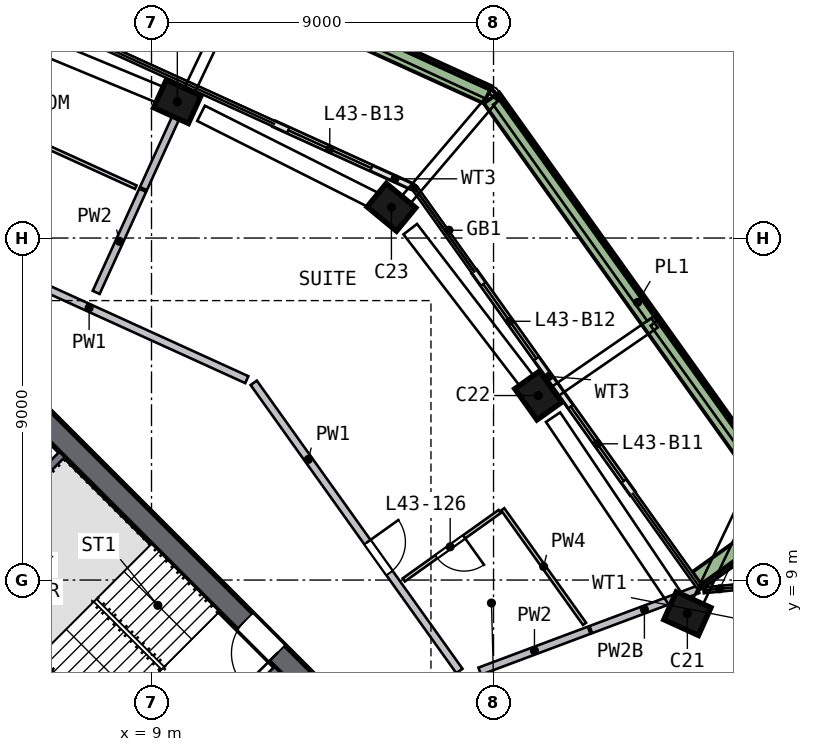
"""IFC4 building model, lengths in metres.
Left out: names, types, materials, properties, quantities, classifications, styles, units other than length and angle.
Written with IfcOpenShell. Run it as: python <this file> out.ifc"""

import sys

from ifc_helpers import new_model, si_unit, direction, frame, frame_2d, origin, origin_2d, place, context, subcontext, project, spatial, rectangle, extrude, element, fill, save


model = new_model("IFC4")
c1 = context("Model", 3, precision=1e-05, world=origin(), true_north=direction((0.0, 1.0)))
c2 = subcontext(c1, "Body", "Model", "MODEL_VIEW")
j1 = project(units=[si_unit("LENGTHUNIT", "METRE"), si_unit("PLANEANGLEUNIT", "RADIAN")], contexts=[c1])
p1 = place(None, origin())
s1 = spatial("IfcSite", under=j1, at=p1, CompositionType="ELEMENT")
p2 = place(p1, origin())
s2 = spatial("IfcBuilding", under=s1, at=p2, CompositionType="ELEMENT")
p3 = place(p2, frame((0.0, 0.0, 180.0)))
s3 = spatial("IfcBuildingStorey", under=s2, at=p3, CompositionType="ELEMENT", Elevation=180.0)
p4 = place(p3, frame((23.147, 7.984, 0.0), z_axis=(-0.038919032, 0.109763833, 0.993195454), x_axis=(0.910035623, -0.4066191, 0.080598211)))
e1 = element("IfcColumn", 1, at=p4, inside=s3, PredefinedType="COLUMN", context=c2, shape_type="SweptSolid", body=[
    extrude(rectangle(XDim=1.0, YDim=0.8, at=origin_2d()), origin(), (0.0, 0.0, 1.0), 3.212),
])
p5 = place(p3, frame((19.256, 13.745, 0.0), z_axis=(-0.066161617, 0.091105306, 0.993641013), x_axis=(-0.577029592, 0.808925346, -0.112590564)))
e2 = element("IfcColumn", 2, at=p5, inside=s3, PredefinedType="COLUMN", context=c2, shape_type="SweptSolid", body=[
    extrude(rectangle(XDim=1.0, YDim=0.8, at=origin_2d()), origin(), (0.0, 0.0, 1.0), 3.21),
])
p6 = place(p3, frame((15.421, 18.721, 0.0), z_axis=(-0.089631902, 0.072602601, 0.993325216), x_axis=(0.766538339, -0.631755416, 0.115343267)))
e3 = element("IfcColumn", 3, at=p6, inside=s3, PredefinedType="COLUMN", context=c2, shape_type="SweptSolid", body=[
    extrude(rectangle(XDim=1.0, YDim=0.8, at=origin_2d()), origin(), (0.0, 0.0, 1.0), 3.211),
])
p7 = place(p3, frame((9.803, 21.531, 0.0), z_axis=(-0.102817207, 0.045781034, 0.993646174), x_axis=(-0.904266328, 0.411868945, -0.112545016)))
e4 = element("IfcColumn", 4, at=p7, inside=s3, PredefinedType="COLUMN", context=c2, shape_type="SweptSolid", body=[
    extrude(rectangle(XDim=1.0, YDim=0.8, at=origin_2d()), origin(), (0.0, 0.0, 1.0), 3.21),
])
p8 = place(p3, frame((13.788, 5.587, 0.0), z_axis=(0.0, 0.0, 1.0), x_axis=(-0.707106781, 0.707106781, 0.0)))
e5 = element("IfcWall", 5, at=p8, inside=s3, PredefinedType="SHEAR", context=c2, shape_type="SweptSolid", body=[
    extrude(rectangle(XDim=11.598, YDim=0.6, at=frame_2d((5.799, 0.0))), origin(), (0.0, 0.0, 1.0), 3.5),
])
p9 = place(p8, frame((2.099, 0.0, 0.0)))
e6 = element("IfcOpeningElement", 6, at=p9, cuts=e5, PredefinedType="OPENING", context=c2, shape_type="SweptSolid", body=[
    extrude(rectangle(XDim=1.2, YDim=2.1, at=frame_2d((0.6, 1.05))), frame((0.0, 0.31, 0.0), z_axis=(0.0, -1.0, 0.0), x_axis=(1.0, 0.0, 0.0)), (0.0, 0.0, 1.0), 0.62),
])
p10 = place(p3, frame((21.658, 11.283, 0.0), z_axis=(0.0, 0.0, 1.0), x_axis=(-0.580980052, 0.813917796, 0.0)))
e7 = element("IfcWall", 7, at=p10, inside=s3, PredefinedType="SOLIDWALL", context=c2, shape_type="SweptSolid", body=[
    extrude(rectangle(XDim=3.4, YDim=0.15, at=frame_2d((1.7, 0.0))), origin(), (0.0, 0.0, 1.0), 2.475),
])
p11 = place(p10, frame((0.4, 0.0, 0.0)))
e8 = element("IfcOpeningElement", 8, at=p11, cuts=e7, PredefinedType="OPENING", context=c2, shape_type="SweptSolid", body=[
    extrude(rectangle(XDim=2.4, YDim=2.4, at=frame_2d((1.2, 1.2))), frame((0.0, 0.085, 0.0), z_axis=(0.0, -1.0, 0.0), x_axis=(1.0, 0.0, 0.0)), (0.0, 0.0, 1.0), 0.17),
])
p12 = place(p3, frame((19.683, 14.05, 0.0), z_axis=(0.0, 0.0, 1.0), x_axis=(-0.581004847, 0.813900097, 0.0)))
e9 = element("IfcWall", 9, at=p12, inside=s3, PredefinedType="SOLIDWALL", context=c2, shape_type="SweptSolid", body=[
    extrude(rectangle(XDim=3.761, YDim=0.15, at=frame_2d((1.881, 0.0))), origin(), (0.0, 0.0, 1.0), 2.475),
])
p13 = place(p12, frame((0.961, 0.0, 0.0)))
e10 = element("IfcOpeningElement", 10, at=p13, cuts=e9, PredefinedType="OPENING", context=c2, shape_type="SweptSolid", body=[
    extrude(rectangle(XDim=2.4, YDim=2.4, at=frame_2d((1.2, 1.2))), frame((0.0, 0.085, 0.0), z_axis=(0.0, -1.0, 0.0), x_axis=(1.0, 0.0, 0.0)), (0.0, 0.0, 1.0), 0.17),
])
p14 = place(p3, frame((15.845, 19.357, 0.0), z_axis=(0.0, 0.0, 1.0), x_axis=(-0.910094415, 0.41440096, 0.0)))
e11 = element("IfcWall", 11, at=p14, inside=s3, PredefinedType="SOLIDWALL", context=c2, shape_type="SweptSolid", body=[
    extrude(rectangle(XDim=3.967, YDim=0.15, at=frame_2d((1.984, 0.0))), origin(), (0.0, 0.0, 1.0), 2.475),
])
p15 = place(p14, frame((1.167, 0.0, 0.0)))
e12 = element("IfcOpeningElement", 12, at=p15, cuts=e11, PredefinedType="OPENING", context=c2, shape_type="SweptSolid", body=[
    extrude(rectangle(XDim=2.4, YDim=2.4, at=frame_2d((1.2, 1.2))), frame((0.0, 0.085, 0.0), z_axis=(0.0, -1.0, 0.0), x_axis=(1.0, 0.0, 0.0)), (0.0, 0.0, 1.0), 0.17),
])
p16 = place(p3, frame((23.376, 9.007, 0.0), z_axis=(0.0, 0.0, 1.0), x_axis=(0.813882991, 0.581028808, 0.0)))
e13 = element("IfcWall", 13, at=p16, inside=s3, PredefinedType="SOLIDWALL", context=c2, shape_type="SweptSolid", body=[
    extrude(rectangle(XDim=3.199, YDim=0.5, at=frame_2d((1.6, 0.0))), origin(), (0.0, 0.0, 1.0), 0.7),
])
p17 = place(p3, frame((25.631, 10.924, 0.0), z_axis=(0.0, 0.0, 1.0), x_axis=(-0.580986673, 0.81391307, 0.0)))
e14 = element("IfcWall", 14, at=p17, inside=s3, PredefinedType="SOLIDWALL", context=c2, shape_type="SweptSolid", body=[
    extrude(rectangle(XDim=13.223, YDim=0.5, at=frame_2d((6.612, 0.0))), origin(), (0.0, 0.0, 1.0), 0.7),
])
p18 = place(p3, frame((17.849, 21.769, 0.0), z_axis=(0.0, 0.0, 1.0), x_axis=(-0.910109197, 0.414368494, 0.0)))
e15 = element("IfcWall", 15, at=p18, inside=s3, PredefinedType="SOLIDWALL", context=c2, shape_type="SweptSolid", body=[
    extrude(rectangle(XDim=13.723, YDim=0.5, at=frame_2d((6.862, 0.0))), origin(), (0.0, 0.0, 1.0), 0.7),
])
p19 = place(p3, frame((3.24, 9.629, 0.0), z_axis=(0.0, 0.0, 1.0), x_axis=(0.707106781, -0.707106781, 0.0)))
e16 = element("IfcWall", 16, at=p19, inside=s3, PredefinedType="SOLIDWALL", context=c2, shape_type="SweptSolid", body=[
    extrude(rectangle(XDim=9.036, YDim=0.2, at=frame_2d((4.518, 0.0))), origin(), (0.0, 0.0, 1.0), 3.19),
])
p20 = place(p19, frame((7.018, 0.0, 0.0)))
e17 = element("IfcOpeningElement", 17, at=p20, cuts=e16, PredefinedType="OPENING", context=c2, shape_type="SweptSolid", body=[
    extrude(rectangle(XDim=1.2, YDim=2.1, at=frame_2d((0.6, 1.05))), frame((0.0, 0.11, 0.0), z_axis=(0.0, -1.0, 0.0), x_axis=(1.0, 0.0, 0.0)), (0.0, 0.0, 1.0), 0.22),
])
for number, where, z_axis, x_axis in (
    (18, (9.334, 3.677, 0.0), (0.0, 0.0, 1.0), (0.707, 0.707, 0.0)),
    (19, (3.677, 9.334, 0.0), (0.0, 0.0, 1.0), (0.707, 0.707, 0.0)),
):
    element("IfcWall", number, at=place(p3, frame(where, z_axis=z_axis, x_axis=x_axis)), inside=s3, PredefinedType="SOLIDWALL", context=c2, shape_type="SweptSolid", body=[
        extrude(rectangle(XDim=4.2, YDim=0.2, at=frame_2d((2.1, 0.0))), origin(), (0.0, 0.0, 1.0), 3.19),
    ])
p21 = place(p3, frame((11.507, 14.273, 0.0), z_axis=(0.0, 0.0, 1.0), x_axis=(-0.910097551, 0.414394073, 0.0)))
e20 = element("IfcWall", 20, at=p21, inside=s3, PredefinedType="SOLIDWALL", context=c2, shape_type="SweptSolid", body=[
    extrude(rectangle(XDim=9.116, YDim=0.2, at=frame_2d((4.558, 0.0))), origin(), (0.0, 0.0, 1.0), 3.19),
])
p22 = place(p3, frame((11.689, 14.19, 0.0), z_axis=(0.0, 0.0, 1.0), x_axis=(0.581002663, -0.813901656, 0.0)))
e21 = element("IfcWall", 21, at=p22, inside=s3, PredefinedType="SOLIDWALL", context=c2, shape_type="SweptSolid", body=[
    extrude(rectangle(XDim=9.316, YDim=0.2, at=frame_2d((4.658, 0.0))), origin(), (0.0, 0.0, 1.0), 3.19),
])
p23 = place(p22, frame((5.15, 0.0, 0.0)))
e22 = element("IfcOpeningElement", 22, at=p23, cuts=e21, PredefinedType="OPENING", context=c2, shape_type="SweptSolid", body=[
    extrude(rectangle(XDim=1.0, YDim=2.1, at=frame_2d((0.5, 1.05))), frame((0.0, 0.11, 0.0), z_axis=(0.0, -1.0, 0.0), x_axis=(1.0, 0.0, 0.0)), (0.0, 0.0, 1.0), 0.22),
])
p24 = place(p3, frame((7.544, 16.569, 0.0), z_axis=(0.0, 0.0, 1.0), x_axis=(0.414394291, 0.910097452, 0.0)))
e23 = element("IfcWall", 23, at=p24, inside=s3, PredefinedType="SOLIDWALL", context=c2, shape_type="SweptSolid", body=[
    extrude(rectangle(XDim=2.955, YDim=0.2, at=frame_2d((1.477, 0.0))), origin(), (0.0, 0.0, 1.0), 3.19),
])
p25 = place(p3, frame((8.787, 19.3, 0.0), z_axis=(0.0, 0.0, 1.0), x_axis=(0.414411335, 0.910089691, 0.0)))
e24 = element("IfcWall", 24, at=p25, inside=s3, PredefinedType="SOLIDWALL", context=c2, shape_type="SweptSolid", body=[
    extrude(rectangle(XDim=2.902, YDim=0.2, at=frame_2d((1.451, 0.0))), origin(), (0.0, 0.0, 1.0), 3.19),
])
p26 = place(p3, frame((17.637, 6.601, 0.0), z_axis=(0.0, 0.0, 1.0), x_axis=(0.936531348, 0.350583848, 0.0)))
e25 = element("IfcWall", 25, at=p26, inside=s3, PredefinedType="SOLIDWALL", context=c2, shape_type="SweptSolid", body=[
    extrude(rectangle(XDim=3.074, YDim=0.2, at=frame_2d((1.537, 0.0))), origin(), (0.0, 0.0, 1.0), 3.19),
])
p27 = place(p3, frame((20.56, 7.695, 0.0), z_axis=(0.0, 0.0, 1.0), x_axis=(0.93656885, 0.350483651, 0.0)))
e26 = element("IfcWall", 26, at=p27, inside=s3, PredefinedType="SOLIDWALL", context=c2, shape_type="SweptSolid", body=[
    extrude(rectangle(XDim=3.011, YDim=0.2, at=frame_2d((1.506, 0.0))), origin(), (0.0, 0.0, 1.0), 2.69),
])
p28 = place(p3, frame((8.585, 19.339, 0.0), z_axis=(0.0, 0.0, 1.0), x_axis=(-0.910093777, 0.414402362, 0.0)))
e27 = element("IfcWall", 27, at=p28, inside=s3, PredefinedType="PARTITIONING", context=c2, shape_type="SweptSolid", body=[
    extrude(rectangle(XDim=2.7, YDim=0.1, at=frame_2d((1.35, 0.0))), origin(), (0.0, 0.0, 1.0), 3.19),
])
p29 = place(p3, frame((18.161, 10.803, 0.0), z_axis=(0.0, 0.0, 1.0), x_axis=(-0.813898407, -0.581007214, 0.0)))
e28 = element("IfcWall", 28, at=p29, inside=s3, PredefinedType="PARTITIONING", context=c2, shape_type="SweptSolid", body=[
    extrude(rectangle(XDim=3.1, YDim=0.1, at=frame_2d((1.55, 0.0))), origin(), (0.0, 0.0, 1.0), 3.19),
])
p30 = place(p29, frame((1.15, 0.0, 0.0)))
e29 = element("IfcOpeningElement", 29, at=p30, cuts=e28, PredefinedType="OPENING", context=c2, shape_type="SweptSolid", body=[
    extrude(rectangle(XDim=0.9, YDim=2.1, at=frame_2d((0.45, 1.05))), frame((0.0, 0.06, 0.0), z_axis=(0.0, -1.0, 0.0), x_axis=(1.0, 0.0, 0.0)), (0.0, 0.0, 1.0), 0.12),
])
p31 = place(p3, frame((18.243, 10.862, 0.0), z_axis=(0.0, 0.0, 1.0), x_axis=(0.580976284, -0.813920486, 0.0)))
e30 = element("IfcWall", 30, at=p31, inside=s3, PredefinedType="PARTITIONING", context=c2, shape_type="SweptSolid", body=[
    extrude(rectangle(XDim=3.704, YDim=0.1, at=frame_2d((1.852, 0.0))), origin(), (0.0, 0.0, 1.0), 3.19),
])
p32 = place(p11, origin())
e31 = element("IfcDoor", 31, at=p32, inside=s3, OperationType="SLIDING_TO_RIGHT", PredefinedType="DOOR", context=c2, shape_type="SweptSolid", body=[
    extrude(rectangle(XDim=2.4, YDim=2.4, at=frame_2d((1.2, 1.2))), frame((0.0, 0.025, 0.0), z_axis=(0.0, -1.0, 0.0), x_axis=(1.0, 0.0, 0.0)), (0.0, 0.0, 1.0), 0.05),
])
fill(e8, e31)
p33 = place(p13, origin())
e32 = element("IfcDoor", 32, at=p33, inside=s3, OperationType="SLIDING_TO_LEFT", PredefinedType="DOOR", context=c2, shape_type="SweptSolid", body=[
    extrude(rectangle(XDim=2.4, YDim=2.4, at=frame_2d((1.2, 1.2))), frame((0.0, 0.025, 0.0), z_axis=(0.0, -1.0, 0.0), x_axis=(1.0, 0.0, 0.0)), (0.0, 0.0, 1.0), 0.05),
])
fill(e10, e32)
p34 = place(p15, origin())
e33 = element("IfcDoor", 33, at=p34, inside=s3, OperationType="SLIDING_TO_LEFT", PredefinedType="DOOR", context=c2, shape_type="SweptSolid", body=[
    extrude(rectangle(XDim=2.4, YDim=2.4, at=frame_2d((1.2, 1.2))), frame((0.0, 0.025, 0.0), z_axis=(0.0, -1.0, 0.0), x_axis=(1.0, 0.0, 0.0)), (0.0, 0.0, 1.0), 0.05),
])
fill(e12, e33)
p35 = place(p9, origin())
e34 = element("IfcDoor", 34, at=p35, inside=s3, OperationType="SINGLE_SWING_LEFT", PredefinedType="DOOR", context=c2, shape_type="SweptSolid", body=[
    extrude(rectangle(XDim=1.2, YDim=2.1, at=frame_2d((0.6, 1.05))), frame((0.0, 0.025, 0.0), z_axis=(0.0, -1.0, 0.0), x_axis=(1.0, 0.0, 0.0)), (0.0, 0.0, 1.0), 0.05),
])
fill(e6, e34)
p36 = place(p23, origin())
e35 = element("IfcDoor", 35, at=p36, inside=s3, OperationType="SINGLE_SWING_LEFT", PredefinedType="DOOR", context=c2, shape_type="SweptSolid", body=[
    extrude(rectangle(XDim=1.0, YDim=2.1, at=frame_2d((0.5, 1.05))), frame((0.0, 0.025, 0.0), z_axis=(0.0, -1.0, 0.0), x_axis=(1.0, 0.0, 0.0)), (0.0, 0.0, 1.0), 0.05),
])
fill(e22, e35)
p37 = place(p30, origin())
e36 = element("IfcDoor", 36, at=p37, inside=s3, OperationType="SINGLE_SWING_LEFT", PredefinedType="DOOR", context=c2, shape_type="SweptSolid", body=[
    extrude(rectangle(XDim=0.9, YDim=2.1, at=frame_2d((0.45, 1.05))), frame((0.0, 0.025, 0.0), z_axis=(0.0, -1.0, 0.0), x_axis=(1.0, 0.0, 0.0)), (0.0, 0.0, 1.0), 0.05),
])
fill(e29, e36)
save(model, sys.argv[1])
